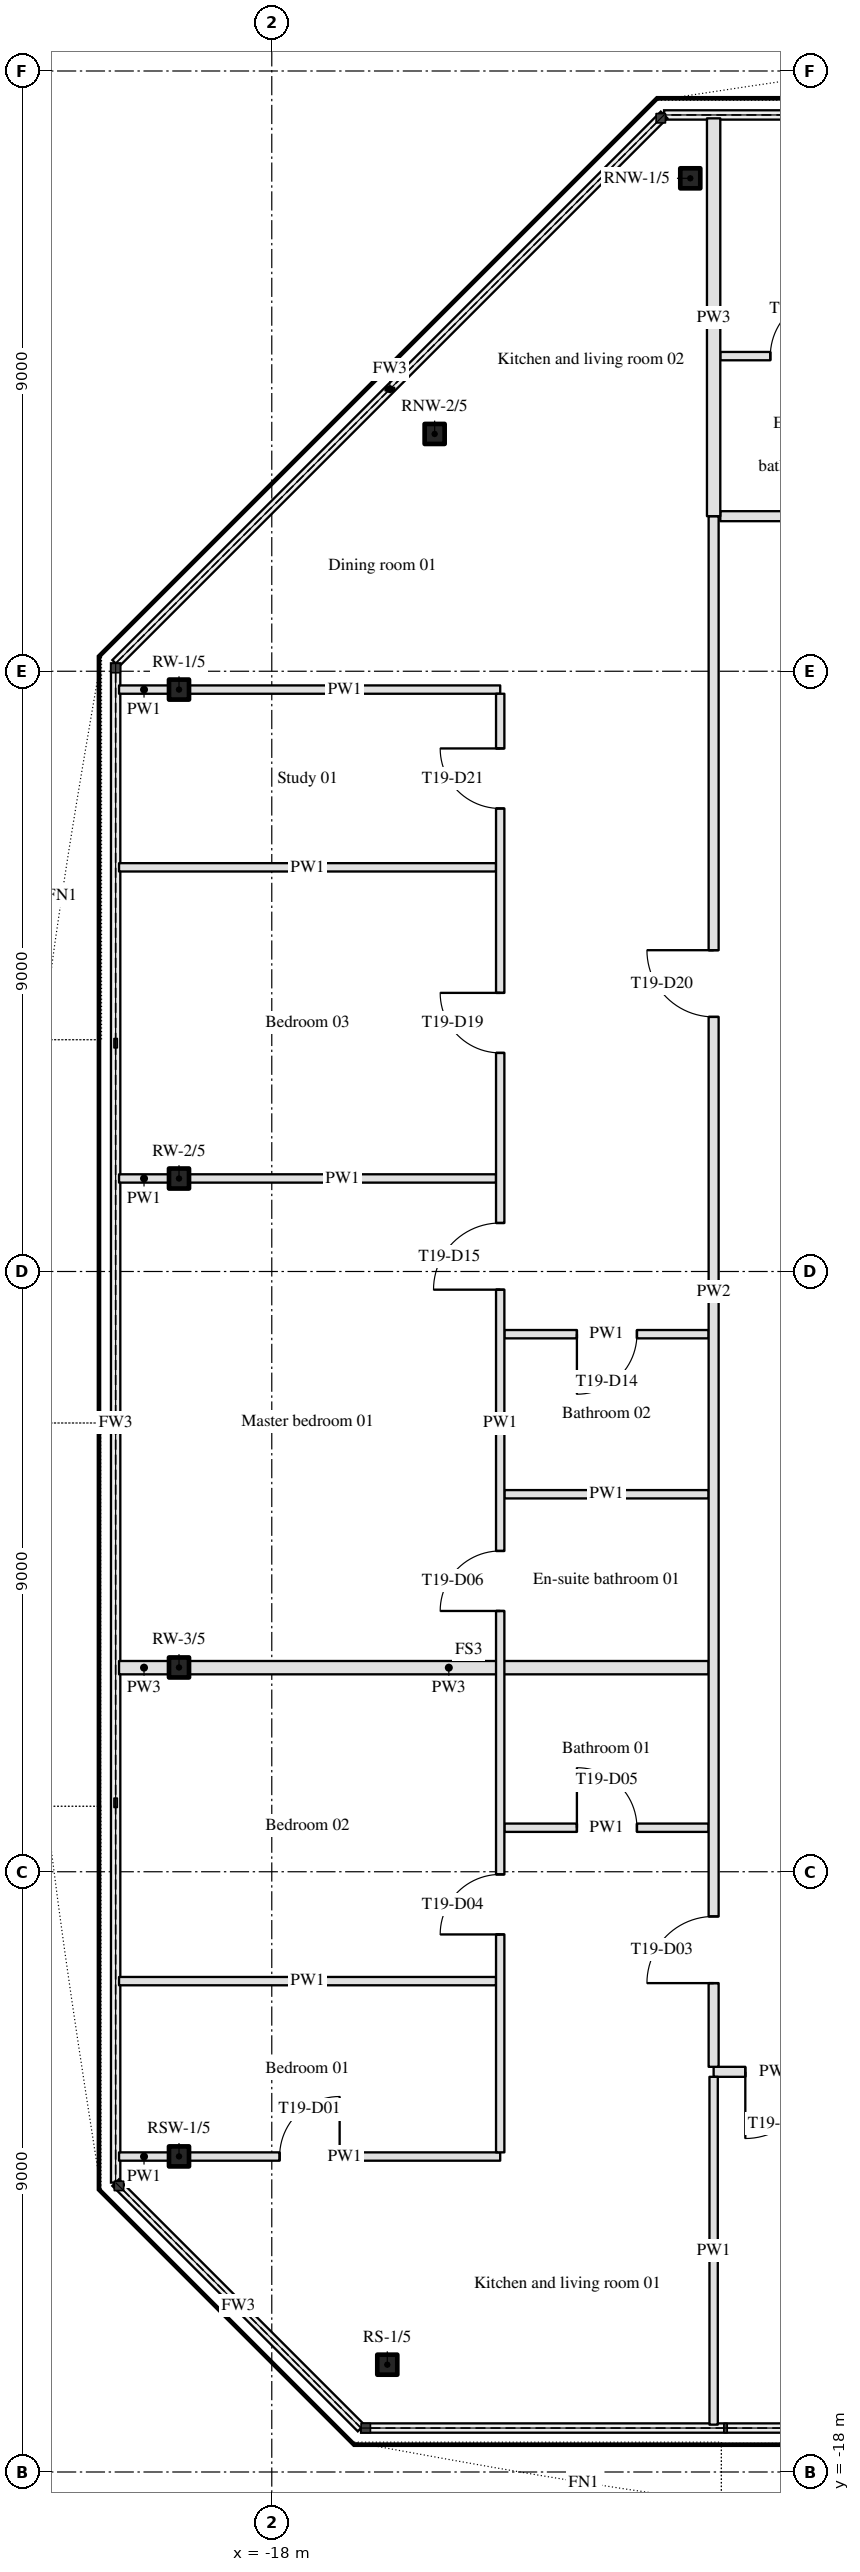
"""IFC4 building model, lengths in metres.
Left out: names, types, materials, properties, quantities, classifications, styles, units other than length and angle.
Written with IfcOpenShell. Run it as: python <this file> out.ifc"""

import sys

from ifc_helpers import new_model, si_unit, direction, frame, frame_2d, origin, origin_2d, place, context, subcontext, project, spatial, rectangle, hollow_rectangle, extrude, element, fill, save


model = new_model("IFC4")
c1 = context("Model", 3, precision=1e-05, world=origin(), true_north=direction((0.0, 1.0)))
c2 = subcontext(c1, "Body", "Model", "MODEL_VIEW")
j1 = project(units=[si_unit("LENGTHUNIT", "METRE"), si_unit("PLANEANGLEUNIT", "RADIAN")], contexts=[c1])
p1 = place(None, origin())
s1 = spatial("IfcSite", under=j1, at=p1, CompositionType="ELEMENT")
p2 = place(p1, origin())
s2 = spatial("IfcBuilding", under=s1, at=p2, CompositionType="ELEMENT")
p3 = place(p2, frame((0.0, 0.0, 251.85)))
s3 = spatial("IfcBuildingStorey", under=s2, at=p3, CompositionType="ELEMENT", Elevation=251.85)
for number, where, z_axis, x_axis in (
    (1, (-16.268, -16.391, 0.0), (0.0, 0.0, 1.0), (1.0, 0.0, 0.0)),
    (2, (-11.725, 16.391, 0.0), (0.0, 0.0, 1.0), (1.0, 0.0, 0.0)),
    (3, (-15.558, 12.558, 0.0), (0.0, 0.0, 1.0), (1.0, 0.0, 0.0)),
    (4, (-19.391, 8.725, 0.0), (0.0, 0.0, 1.0), (1.0, 0.0, 0.0)),
    (5, (-19.391, 1.394, 0.0), (0.0, 0.0, 1.0), (1.0, 0.0, 0.0)),
    (6, (-19.391, -5.937, 0.0), (0.0, 0.0, 1.0), (1.0, 0.0, 0.0)),
    (7, (-19.391, -13.268, 0.0), (0.0, 0.0, 1.0), (1.0, 0.0, 0.0)),
):
    element("IfcColumn", number, at=place(p3, frame(where, z_axis=z_axis, x_axis=x_axis)), inside=s3, PredefinedType="COLUMN", context=c2, shape_type="SweptSolid", body=[
        extrude(hollow_rectangle(XDim=0.3, YDim=0.3, WallThickness=0.02, InnerFilletRadius=0.03, OuterFilletRadius=0.05, at=origin_2d()), origin(), (0.0, 0.0, 1.0), 3.15),
    ])
p4 = place(p3, frame((-20.29, -13.27, 0.0), z_axis=(0.0, 0.0, 1.0), x_axis=(1.0, 0.0, 0.0)))
e8 = element("IfcWall", 8, at=p4, inside=s3, PredefinedType="PARTITIONING", context=c2, shape_type="SweptSolid", body=[
    extrude(rectangle(XDim=0.749, YDim=0.125, at=frame_2d((0.375, 0.0))), origin(), (0.0, 0.0, 1.0), 2.21),
])
p5 = place(p3, frame((-19.241, -13.27, 0.0), z_axis=(0.0, 0.0, 1.0), x_axis=(1.0, 0.0, 0.0)))
e9 = element("IfcWall", 9, at=p5, inside=s3, PredefinedType="PARTITIONING", context=c2, shape_type="SweptSolid", body=[
    extrude(rectangle(XDim=4.666, YDim=0.125, at=frame_2d((2.333, 0.0))), origin(), (0.0, 0.0, 1.0), 2.21),
])
p6 = place(p5, frame((1.358, 0.0, 0.0)))
e10 = element("IfcOpeningElement", 10, at=p6, cuts=e9, PredefinedType="OPENING", context=c2, shape_type="SweptSolid", body=[
    extrude(rectangle(XDim=0.9, YDim=2.1, at=frame_2d((0.45, 1.05))), frame((0.0, 0.073, 0.0), z_axis=(0.0, -1.0, 0.0), x_axis=(1.0, 0.0, 0.0)), (0.0, 0.0, 1.0), 0.145),
])
p7 = place(p3, frame((-9.5, -12.0, 0.0), z_axis=(0.0, 0.0, 1.0), x_axis=(-1.0, 0.0, 0.0)))
e11 = element("IfcWall", 11, at=p7, inside=s3, PredefinedType="PARTITIONING", context=c2, shape_type="SweptSolid", body=[
    extrude(rectangle(XDim=1.875, YDim=0.15, at=frame_2d((0.938, 0.0))), origin(), (0.0, 0.0, 1.0), 2.21),
])
p8 = place(p7, frame((0.4, 0.0, 0.0)))
e12 = element("IfcOpeningElement", 12, at=p8, cuts=e11, PredefinedType="OPENING", context=c2, shape_type="SweptSolid", body=[
    extrude(rectangle(XDim=1.0, YDim=2.1, at=frame_2d((0.5, 1.05))), frame((0.0, 0.085, 0.0), z_axis=(0.0, -1.0, 0.0), x_axis=(1.0, 0.0, 0.0)), (0.0, 0.0, 1.0), 0.17),
])
p9 = place(p3, frame((-20.29, -10.64, 0.0), z_axis=(0.0, 0.0, 1.0), x_axis=(1.0, 0.0, 0.0)))
e13 = element("IfcWall", 13, at=p9, inside=s3, PredefinedType="PARTITIONING", context=c2, shape_type="SweptSolid", body=[
    extrude(rectangle(XDim=5.653, YDim=0.125, at=frame_2d((2.826, 0.0))), origin(), (0.0, 0.0, 1.0), 2.21),
])
p10 = place(p3, frame((-14.512, -8.34, 0.0), z_axis=(0.0, 0.0, 1.0), x_axis=(1.0, 0.0, 0.0)))
e14 = element("IfcWall", 14, at=p10, inside=s3, PredefinedType="PARTITIONING", context=c2, shape_type="SweptSolid", body=[
    extrude(rectangle(XDim=3.062, YDim=0.125, at=frame_2d((1.531, 0.0))), origin(), (0.0, 0.0, 1.0), 2.21),
])
p11 = place(p10, frame((1.087, 0.0, 0.0)))
e15 = element("IfcOpeningElement", 15, at=p11, cuts=e14, PredefinedType="OPENING", context=c2, shape_type="SweptSolid", body=[
    extrude(rectangle(XDim=0.9, YDim=2.1, at=frame_2d((0.45, 1.05))), frame((0.0, 0.073, 0.0), z_axis=(0.0, -1.0, 0.0), x_axis=(1.0, 0.0, 0.0)), (0.0, 0.0, 1.0), 0.145),
])
p12 = place(p3, frame((-20.29, -5.94, 0.0), z_axis=(0.0, 0.0, 1.0), x_axis=(1.0, 0.0, 0.0)))
e16 = element("IfcWall", 16, at=p12, inside=s3, PredefinedType="PARTITIONING", context=c2, shape_type="SweptSolid", body=[
    extrude(rectangle(XDim=0.749, YDim=0.2, at=frame_2d((0.375, 0.0))), origin(), (0.0, 0.0, 1.0), 2.21),
])
p13 = place(p3, frame((-19.241, -5.94, 0.0), z_axis=(0.0, 0.0, 1.0), x_axis=(1.0, 0.0, 0.0)))
e17 = element("IfcWall", 17, at=p13, inside=s3, PredefinedType="PARTITIONING", context=c2, shape_type="SweptSolid", body=[
    extrude(rectangle(XDim=7.791, YDim=0.2, at=frame_2d((3.896, 0.0))), origin(), (0.0, 0.0, 1.0), 2.21),
])
p14 = place(p3, frame((-14.512, -3.34, 0.0), z_axis=(0.0, 0.0, 1.0), x_axis=(1.0, 0.0, 0.0)))
e18 = element("IfcWall", 18, at=p14, inside=s3, PredefinedType="PARTITIONING", context=c2, shape_type="SweptSolid", body=[
    extrude(rectangle(XDim=3.062, YDim=0.125, at=frame_2d((1.531, 0.0))), origin(), (0.0, 0.0, 1.0), 2.21),
])
p15 = place(p3, frame((-11.45, -0.94, 0.0), z_axis=(0.0, 0.0, 1.0), x_axis=(-1.0, 0.0, 0.0)))
e19 = element("IfcWall", 19, at=p15, inside=s3, PredefinedType="PARTITIONING", context=c2, shape_type="SweptSolid", body=[
    extrude(rectangle(XDim=3.062, YDim=0.125, at=frame_2d((1.531, 0.0))), origin(), (0.0, 0.0, 1.0), 2.21),
])
p16 = place(p15, frame((1.075, 0.0, 0.0)))
e20 = element("IfcOpeningElement", 20, at=p16, cuts=e19, PredefinedType="OPENING", context=c2, shape_type="SweptSolid", body=[
    extrude(rectangle(XDim=0.9, YDim=2.1, at=frame_2d((0.45, 1.05))), frame((0.0, 0.073, 0.0), z_axis=(0.0, -1.0, 0.0), x_axis=(1.0, 0.0, 0.0)), (0.0, 0.0, 1.0), 0.145),
])
p17 = place(p3, frame((-20.29, 1.395, 0.0), z_axis=(0.0, 0.0, 1.0), x_axis=(1.0, 0.0, 0.0)))
e21 = element("IfcWall", 21, at=p17, inside=s3, PredefinedType="PARTITIONING", context=c2, shape_type="SweptSolid", body=[
    extrude(rectangle(XDim=0.749, YDim=0.125, at=frame_2d((0.375, 0.0))), origin(), (0.0, 0.0, 1.0), 2.21),
])
p18 = place(p3, frame((-19.241, 1.395, 0.0), z_axis=(0.0, 0.0, 1.0), x_axis=(1.0, 0.0, 0.0)))
e22 = element("IfcWall", 22, at=p18, inside=s3, PredefinedType="PARTITIONING", context=c2, shape_type="SweptSolid", body=[
    extrude(rectangle(XDim=4.604, YDim=0.125, at=frame_2d((2.302, 0.0))), origin(), (0.0, 0.0, 1.0), 2.21),
])
p19 = place(p3, frame((-20.29, 6.06, 0.0), z_axis=(0.0, 0.0, 1.0), x_axis=(1.0, 0.0, 0.0)))
e23 = element("IfcWall", 23, at=p19, inside=s3, PredefinedType="PARTITIONING", context=c2, shape_type="SweptSolid", body=[
    extrude(rectangle(XDim=5.653, YDim=0.125, at=frame_2d((2.826, 0.0))), origin(), (0.0, 0.0, 1.0), 2.21),
])
p20 = place(p3, frame((-20.29, 8.725, 0.0), z_axis=(0.0, 0.0, 1.0), x_axis=(1.0, 0.0, 0.0)))
e24 = element("IfcWall", 24, at=p20, inside=s3, PredefinedType="PARTITIONING", context=c2, shape_type="SweptSolid", body=[
    extrude(rectangle(XDim=0.749, YDim=0.125, at=frame_2d((0.375, 0.0))), origin(), (0.0, 0.0, 1.0), 2.21),
])
p21 = place(p3, frame((-19.241, 8.725, 0.0), z_axis=(0.0, 0.0, 1.0), x_axis=(1.0, 0.0, 0.0)))
e25 = element("IfcWall", 25, at=p21, inside=s3, PredefinedType="PARTITIONING", context=c2, shape_type="SweptSolid", body=[
    extrude(rectangle(XDim=4.666, YDim=0.125, at=frame_2d((2.333, 0.0))), origin(), (0.0, 0.0, 1.0), 2.21),
])
p22 = place(p3, frame((-11.275, 11.325, 0.0), z_axis=(0.0, 0.0, 1.0), x_axis=(1.0, 0.0, 0.0)))
e26 = element("IfcWall", 26, at=p22, inside=s3, PredefinedType="PARTITIONING", context=c2, shape_type="SweptSolid", body=[
    extrude(rectangle(XDim=22.575, YDim=0.15, at=frame_2d((11.288, 0.0))), origin(), (0.0, 0.0, 1.0), 2.21),
])
p23 = place(p22, frame((8.038, 0.0, 0.0)))
e27 = element("IfcOpeningElement", 27, at=p23, cuts=e26, PredefinedType="OPENING", context=c2, shape_type="SweptSolid", body=[
    extrude(rectangle(XDim=1.0, YDim=2.1, at=frame_2d((0.5, 1.05))), frame((0.0, 0.085, 0.0), z_axis=(0.0, -1.0, 0.0), x_axis=(1.0, 0.0, 0.0)), (0.0, 0.0, 1.0), 0.17),
])
p24 = place(p22, frame((21.025, 0.0, 0.0)))
e28 = element("IfcOpeningElement", 28, at=p24, cuts=e26, PredefinedType="OPENING", context=c2, shape_type="SweptSolid", body=[
    extrude(rectangle(XDim=1.0, YDim=2.1, at=frame_2d((0.5, 1.05))), frame((0.0, 0.085, 0.0), z_axis=(0.0, -1.0, 0.0), x_axis=(1.0, 0.0, 0.0)), (0.0, 0.0, 1.0), 0.17),
])
p25 = place(p3, frame((-11.275, 13.725, 0.0), z_axis=(0.0, 0.0, 1.0), x_axis=(1.0, 0.0, 0.0)))
e29 = element("IfcWall", 29, at=p25, inside=s3, PredefinedType="PARTITIONING", context=c2, shape_type="SweptSolid", body=[
    extrude(rectangle(XDim=8.275, YDim=0.125, at=frame_2d((4.137, 0.0))), origin(), (0.0, 0.0, 1.0), 2.21),
])
p26 = place(p25, frame((5.637, 0.0, 0.0)))
e30 = element("IfcOpeningElement", 30, at=p26, cuts=e29, PredefinedType="OPENING", context=c2, shape_type="SweptSolid", body=[
    extrude(rectangle(XDim=0.9, YDim=2.1, at=frame_2d((0.45, 1.05))), frame((0.0, 0.073, 0.0), z_axis=(0.0, -1.0, 0.0), x_axis=(1.0, 0.0, 0.0)), (0.0, 0.0, 1.0), 0.145),
])
p27 = place(p25, frame((2.7, 0.0, 0.0)))
e31 = element("IfcOpeningElement", 31, at=p27, cuts=e29, PredefinedType="OPENING", context=c2, shape_type="SweptSolid", body=[
    extrude(rectangle(XDim=1.0, YDim=2.1, at=frame_2d((0.5, 1.05))), frame((0.0, 0.073, 0.0), z_axis=(0.0, -1.0, 0.0), x_axis=(1.0, 0.0, 0.0)), (0.0, 0.0, 1.0), 0.145),
])
p28 = place(p25, frame((0.75, 0.0, 0.0)))
e32 = element("IfcOpeningElement", 32, at=p28, cuts=e29, PredefinedType="OPENING", context=c2, shape_type="SweptSolid", body=[
    extrude(rectangle(XDim=0.9, YDim=2.1, at=frame_2d((0.45, 1.05))), frame((0.0, 0.073, 0.0), z_axis=(0.0, -1.0, 0.0), x_axis=(1.0, 0.0, 0.0)), (0.0, 0.0, 1.0), 0.145),
])
p29 = place(p3, frame((-14.575, -13.208, 0.0), z_axis=(0.0, 0.0, 1.0), x_axis=(0.0, 1.0, 0.0)))
e33 = element("IfcWall", 33, at=p29, inside=s3, PredefinedType="PARTITIONING", context=c2, shape_type="SweptSolid", body=[
    extrude(rectangle(XDim=21.87, YDim=0.125, at=frame_2d((10.935, 0.0))), origin(), (0.0, 0.0, 1.0), 2.21),
])
p30 = place(p29, frame((3.268, 0.0, 0.0)))
e34 = element("IfcOpeningElement", 34, at=p30, cuts=e33, PredefinedType="OPENING", context=c2, shape_type="SweptSolid", body=[
    extrude(rectangle(XDim=0.9, YDim=2.1, at=frame_2d((0.45, 1.05))), frame((0.0, 0.073, 0.0), z_axis=(0.0, -1.0, 0.0), x_axis=(1.0, 0.0, 0.0)), (0.0, 0.0, 1.0), 0.145),
])
p31 = place(p29, frame((16.485, 0.0, 0.0)))
e35 = element("IfcOpeningElement", 35, at=p31, cuts=e33, PredefinedType="OPENING", context=c2, shape_type="SweptSolid", body=[
    extrude(rectangle(XDim=0.9, YDim=2.1, at=frame_2d((0.45, 1.05))), frame((0.0, 0.073, 0.0), z_axis=(0.0, -1.0, 0.0), x_axis=(1.0, 0.0, 0.0)), (0.0, 0.0, 1.0), 0.145),
])
p32 = place(p29, frame((12.935, 0.0, 0.0)))
e36 = element("IfcOpeningElement", 36, at=p32, cuts=e33, PredefinedType="OPENING", context=c2, shape_type="SweptSolid", body=[
    extrude(rectangle(XDim=1.0, YDim=2.1, at=frame_2d((0.5, 1.05))), frame((0.0, 0.073, 0.0), z_axis=(0.0, -1.0, 0.0), x_axis=(1.0, 0.0, 0.0)), (0.0, 0.0, 1.0), 0.145),
])
p33 = place(p29, frame((20.15, 0.0, 0.0)))
e37 = element("IfcOpeningElement", 37, at=p33, cuts=e33, PredefinedType="OPENING", context=c2, shape_type="SweptSolid", body=[
    extrude(rectangle(XDim=0.9, YDim=2.1, at=frame_2d((0.45, 1.05))), frame((0.0, 0.073, 0.0), z_axis=(0.0, -1.0, 0.0), x_axis=(1.0, 0.0, 0.0)), (0.0, 0.0, 1.0), 0.145),
])
p34 = place(p29, frame((8.117, 0.0, 0.0)))
e38 = element("IfcOpeningElement", 38, at=p34, cuts=e33, PredefinedType="OPENING", context=c2, shape_type="SweptSolid", body=[
    extrude(rectangle(XDim=0.9, YDim=2.1, at=frame_2d((0.45, 1.05))), frame((0.0, 0.073, 0.0), z_axis=(0.0, -1.0, 0.0), x_axis=(1.0, 0.0, 0.0)), (0.0, 0.0, 1.0), 0.145),
])
p35 = place(p3, frame((-11.375, -17.29, 0.0), z_axis=(0.0, 0.0, 1.0), x_axis=(0.0, 1.0, 0.0)))
e39 = element("IfcWall", 39, at=p35, inside=s3, PredefinedType="PARTITIONING", context=c2, shape_type="SweptSolid", body=[
    extrude(rectangle(XDim=5.215, YDim=0.125, at=frame_2d((2.607, 0.0))), origin(), (0.0, 0.0, 1.0), 2.21),
])
p36 = place(p3, frame((-11.375, -11.925, 0.0), z_axis=(0.0, 0.0, 1.0), x_axis=(0.0, 1.0, 0.0)))
e40 = element("IfcWall", 40, at=p36, inside=s3, PredefinedType="PARTITIONING", context=c2, shape_type="SweptSolid", body=[
    extrude(rectangle(XDim=23.25, YDim=0.15, at=frame_2d((11.625, 0.0))), origin(), (0.0, 0.0, 1.0), 2.21),
])
p37 = place(p36, frame((1.255, 0.0, 0.0)))
e41 = element("IfcOpeningElement", 41, at=p37, cuts=e40, PredefinedType="OPENING", context=c2, shape_type="SweptSolid", body=[
    extrude(rectangle(XDim=1.0, YDim=2.1, at=frame_2d((0.5, 1.05))), frame((0.0, 0.085, 0.0), z_axis=(0.0, -1.0, 0.0), x_axis=(1.0, 0.0, 0.0)), (0.0, 0.0, 1.0), 0.17),
])
p38 = place(p36, frame((15.742, 0.0, 0.0)))
e42 = element("IfcOpeningElement", 42, at=p38, cuts=e40, PredefinedType="OPENING", context=c2, shape_type="SweptSolid", body=[
    extrude(rectangle(XDim=1.0, YDim=2.1, at=frame_2d((0.5, 1.05))), frame((0.0, 0.085, 0.0), z_axis=(0.0, -1.0, 0.0), x_axis=(1.0, 0.0, 0.0)), (0.0, 0.0, 1.0), 0.17),
])
p39 = place(p3, frame((-11.375, 11.325, 0.0), z_axis=(0.0, 0.0, 1.0), x_axis=(0.0, 1.0, 0.0)))
e43 = element("IfcWall", 43, at=p39, inside=s3, PredefinedType="PARTITIONING", context=c2, shape_type="SweptSolid", body=[
    extrude(rectangle(XDim=5.965, YDim=0.2, at=frame_2d((2.982, 0.0))), origin(), (0.0, 0.0, 1.0), 2.21),
])
p40 = place(p37, origin())
e44 = element("IfcDoor", 44, at=p40, inside=s3, OperationType="SINGLE_SWING_LEFT", PredefinedType="DOOR", context=c2, shape_type="SweptSolid", body=[
    extrude(rectangle(XDim=1.0, YDim=2.1, at=frame_2d((0.5, 1.05))), frame((0.0, 0.025, 0.0), z_axis=(0.0, -1.0, 0.0), x_axis=(1.0, 0.0, 0.0)), (0.0, 0.0, 1.0), 0.05),
])
fill(e41, e44)
p41 = place(p38, origin())
e45 = element("IfcDoor", 45, at=p41, inside=s3, OperationType="SINGLE_SWING_RIGHT", PredefinedType="DOOR", context=c2, shape_type="SweptSolid", body=[
    extrude(rectangle(XDim=1.0, YDim=2.1, at=frame_2d((0.5, 1.05))), frame((0.0, 0.025, 0.0), z_axis=(0.0, -1.0, 0.0), x_axis=(1.0, 0.0, 0.0)), (0.0, 0.0, 1.0), 0.05),
])
fill(e42, e45)
p42 = place(p11, origin())
e46 = element("IfcDoor", 46, at=p42, inside=s3, OperationType="SINGLE_SWING_LEFT", PredefinedType="DOOR", context=c2, shape_type="SweptSolid", body=[
    extrude(rectangle(XDim=0.9, YDim=2.1, at=frame_2d((0.45, 1.05))), frame((0.0, 0.025, 0.0), z_axis=(0.0, -1.0, 0.0), x_axis=(1.0, 0.0, 0.0)), (0.0, 0.0, 1.0), 0.05),
])
fill(e15, e46)
p43 = place(p6, origin())
e47 = element("IfcDoor", 47, at=p43, inside=s3, OperationType="SINGLE_SWING_RIGHT", PredefinedType="DOOR", context=c2, shape_type="SweptSolid", body=[
    extrude(rectangle(XDim=0.9, YDim=2.1, at=frame_2d((0.45, 1.05))), frame((0.0, 0.025, 0.0), z_axis=(0.0, -1.0, 0.0), x_axis=(1.0, 0.0, 0.0)), (0.0, 0.0, 1.0), 0.05),
])
fill(e10, e47)
p44 = place(p30, origin())
e48 = element("IfcDoor", 48, at=p44, inside=s3, OperationType="SINGLE_SWING_LEFT", PredefinedType="DOOR", context=c2, shape_type="SweptSolid", body=[
    extrude(rectangle(XDim=0.9, YDim=2.1, at=frame_2d((0.45, 1.05))), frame((0.0, 0.025, 0.0), z_axis=(0.0, -1.0, 0.0), x_axis=(1.0, 0.0, 0.0)), (0.0, 0.0, 1.0), 0.05),
])
fill(e34, e48)
p45 = place(p16, origin())
e49 = element("IfcDoor", 49, at=p45, inside=s3, OperationType="SINGLE_SWING_RIGHT", PredefinedType="DOOR", context=c2, shape_type="SweptSolid", body=[
    extrude(rectangle(XDim=0.9, YDim=2.1, at=frame_2d((0.45, 1.05))), frame((0.0, 0.025, 0.0), z_axis=(0.0, -1.0, 0.0), x_axis=(1.0, 0.0, 0.0)), (0.0, 0.0, 1.0), 0.05),
])
fill(e20, e49)
p46 = place(p31, origin())
e50 = element("IfcDoor", 50, at=p46, inside=s3, OperationType="SINGLE_SWING_RIGHT", PredefinedType="DOOR", context=c2, shape_type="SweptSolid", body=[
    extrude(rectangle(XDim=0.9, YDim=2.1, at=frame_2d((0.45, 1.05))), frame((0.0, 0.025, 0.0), z_axis=(0.0, -1.0, 0.0), x_axis=(1.0, 0.0, 0.0)), (0.0, 0.0, 1.0), 0.05),
])
fill(e35, e50)
p47 = place(p32, origin())
e51 = element("IfcDoor", 51, at=p47, inside=s3, OperationType="SINGLE_SWING_LEFT", PredefinedType="DOOR", context=c2, shape_type="SweptSolid", body=[
    extrude(rectangle(XDim=1.0, YDim=2.1, at=frame_2d((0.5, 1.05))), frame((0.0, 0.025, 0.0), z_axis=(0.0, -1.0, 0.0), x_axis=(1.0, 0.0, 0.0)), (0.0, 0.0, 1.0), 0.05),
])
fill(e36, e51)
p48 = place(p33, origin())
e52 = element("IfcDoor", 52, at=p48, inside=s3, OperationType="SINGLE_SWING_RIGHT", PredefinedType="DOOR", context=c2, shape_type="SweptSolid", body=[
    extrude(rectangle(XDim=0.9, YDim=2.1, at=frame_2d((0.45, 1.05))), frame((0.0, 0.025, 0.0), z_axis=(0.0, -1.0, 0.0), x_axis=(1.0, 0.0, 0.0)), (0.0, 0.0, 1.0), 0.05),
])
fill(e37, e52)
p49 = place(p34, origin())
e53 = element("IfcDoor", 53, at=p49, inside=s3, OperationType="SINGLE_SWING_LEFT", PredefinedType="DOOR", context=c2, shape_type="SweptSolid", body=[
    extrude(rectangle(XDim=0.9, YDim=2.1, at=frame_2d((0.45, 1.05))), frame((0.0, 0.025, 0.0), z_axis=(0.0, -1.0, 0.0), x_axis=(1.0, 0.0, 0.0)), (0.0, 0.0, 1.0), 0.05),
])
fill(e38, e53)
p50 = place(p8, origin())
e54 = element("IfcDoor", 54, at=p50, inside=s3, OperationType="SINGLE_SWING_RIGHT", PredefinedType="DOOR", context=c2, shape_type="SweptSolid", body=[
    extrude(rectangle(XDim=1.0, YDim=2.1, at=frame_2d((0.5, 1.05))), frame((0.0, 0.025, 0.0), z_axis=(0.0, -1.0, 0.0), x_axis=(1.0, 0.0, 0.0)), (0.0, 0.0, 1.0), 0.05),
])
fill(e12, e54)
p51 = place(p28, origin())
e55 = element("IfcDoor", 55, at=p51, inside=s3, OperationType="SINGLE_SWING_RIGHT", PredefinedType="DOOR", context=c2, shape_type="SweptSolid", body=[
    extrude(rectangle(XDim=0.9, YDim=2.1, at=frame_2d((0.45, 1.05))), frame((0.0, 0.025, 0.0), z_axis=(0.0, -1.0, 0.0), x_axis=(1.0, 0.0, 0.0)), (0.0, 0.0, 1.0), 0.05),
])
fill(e32, e55)
save(model, sys.argv[1])
